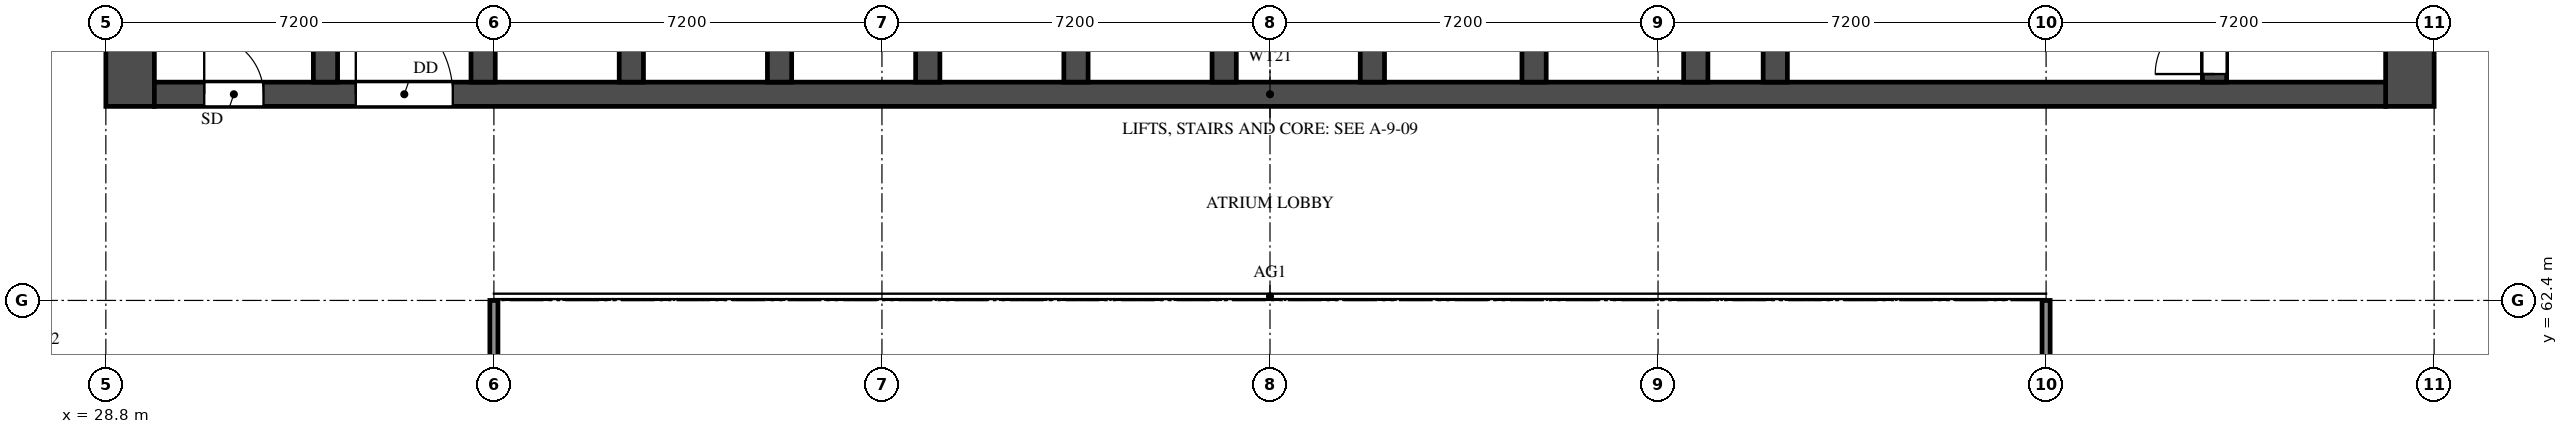
"""IFC4 building model, lengths in metres.
Left out: names, types, materials, properties, quantities, classifications, styles, units other than length and angle.
Written with IfcOpenShell. Run it as: python <this file> out.ifc"""

import sys

from ifc_helpers import new_model, si_unit, direction, frame, frame_2d, origin, place, context, subcontext, project, spatial, rectangle, extrude, element, fill, save


model = new_model("IFC4")
c1 = context("Model", 3, precision=1e-05, world=origin(), true_north=direction((0.0, 1.0)))
c2 = subcontext(c1, "Body", "Model", "MODEL_VIEW")
j1 = project(units=[si_unit("LENGTHUNIT", "METRE"), si_unit("PLANEANGLEUNIT", "RADIAN")], contexts=[c1])
p1 = place(None, origin())
s1 = spatial("IfcSite", under=j1, at=p1, CompositionType="ELEMENT")
p2 = place(p1, origin())
s2 = spatial("IfcBuilding", under=s1, at=p2, CompositionType="ELEMENT")
p3 = place(p2, frame((0.0, 0.0, 48.0)))
s3 = spatial("IfcBuildingStorey", under=s2, at=p3, CompositionType="ELEMENT", Elevation=48.0)
for number, where, z_axis, x_axis in (
    (1, (29.25, 66.0, 0.0), (0.0, 0.0, 1.0), (0.0, 1.0, 0.0)),
    (2, (71.55, 66.0, 0.0), (0.0, 0.0, 1.0), (0.0, 1.0, 0.0)),
):
    element("IfcWall", number, at=place(p3, frame(where, z_axis=z_axis, x_axis=x_axis)), inside=s3, PredefinedType="SHEAR", context=c2, shape_type="SweptSolid", body=[
        extrude(rectangle(XDim=12.0, YDim=0.9, at=frame_2d((6.0, 0.0))), origin(), (0.0, 0.0, 1.0), 3.18),
    ])
p4 = place(p3, frame((29.7, 66.225, 0.0), z_axis=(0.0, 0.0, 1.0), x_axis=(1.0, 0.0, 0.0)))
e3 = element("IfcWall", 3, at=p4, inside=s3, PredefinedType="SHEAR", context=c2, shape_type="SweptSolid", body=[
    extrude(rectangle(XDim=41.4, YDim=0.45, at=frame_2d((20.7, 0.0))), origin(), (0.0, 0.0, 1.0), 3.18),
])
p5 = place(p4, frame((0.925, 0.0, 0.0)))
e4 = element("IfcOpeningElement", 4, at=p5, cuts=e3, PredefinedType="OPENING", context=c2, shape_type="SweptSolid", body=[
    extrude(rectangle(XDim=1.1, YDim=2.1, at=frame_2d((0.55, 1.05))), frame((0.0, 0.235, 0.0), z_axis=(0.0, -1.0, 0.0), x_axis=(1.0, 0.0, 0.0)), (0.0, 0.0, 1.0), 0.47),
])
p6 = place(p4, frame((3.738, 0.0, 0.0)))
e5 = element("IfcOpeningElement", 5, at=p6, cuts=e3, PredefinedType="OPENING", context=c2, shape_type="SweptSolid", body=[
    extrude(rectangle(XDim=1.8, YDim=2.1, at=frame_2d((0.9, 1.05))), frame((0.0, 0.235, 0.0), z_axis=(0.0, -1.0, 0.0), x_axis=(1.0, 0.0, 0.0)), (0.0, 0.0, 1.0), 0.47),
])
p7 = place(p3, frame((32.875, 66.45, 0.0), z_axis=(0.0, 0.0, 1.0), x_axis=(0.0, 1.0, 0.0)))
e6 = element("IfcWall", 6, at=p7, inside=s3, PredefinedType="SHEAR", context=c2, shape_type="SweptSolid", body=[
    extrude(rectangle(XDim=10.65, YDim=0.45, at=frame_2d((5.325, 0.0))), origin(), (0.0, 0.0, 1.0), 3.18),
])
p8 = place(p3, frame((67.925, 66.45, 0.0), z_axis=(0.0, 0.0, 1.0), x_axis=(0.0, 1.0, 0.0)))
e7 = element("IfcWall", 7, at=p8, inside=s3, PredefinedType="SHEAR", context=c2, shape_type="SweptSolid", body=[
    extrude(rectangle(XDim=10.65, YDim=0.45, at=frame_2d((5.325, 0.0))), origin(), (0.0, 0.0, 1.0), 3.18),
])
p9 = place(p8, frame((0.15, 0.0, 0.0)))
e8 = element("IfcOpeningElement", 8, at=p9, cuts=e7, PredefinedType="OPENING", context=c2, shape_type="SweptSolid", body=[
    extrude(rectangle(XDim=1.1, YDim=2.1, at=frame_2d((0.55, 1.05))), frame((0.0, 0.235, 0.0), z_axis=(0.0, -1.0, 0.0), x_axis=(1.0, 0.0, 0.0)), (0.0, 0.0, 1.0), 0.47),
])
p10 = place(p3, frame((59.775, 66.45, 0.0), z_axis=(0.0, 0.0, 1.0), x_axis=(0.0, 1.0, 0.0)))
e9 = element("IfcWall", 9, at=p10, inside=s3, PredefinedType="SHEAR", context=c2, shape_type="SweptSolid", body=[
    extrude(rectangle(XDim=6.025, YDim=0.45, at=frame_2d((3.013, 0.0))), origin(), (0.0, 0.0, 1.0), 3.18),
])
p11 = place(p10, frame((3.85, 0.0, 0.0)))
e10 = element("IfcOpeningElement", 10, at=p11, cuts=e9, PredefinedType="OPENING", context=c2, shape_type="SweptSolid", body=[
    extrude(rectangle(XDim=1.2, YDim=2.1, at=frame_2d((0.6, 1.05))), frame((0.0, 0.235, 0.0), z_axis=(0.0, -1.0, 0.0), x_axis=(1.0, 0.0, 0.0)), (0.0, 0.0, 1.0), 0.47),
])
for number, where, z_axis, x_axis in (
    (11, (35.8, 66.45, 0.0), (0.0, 0.0, 1.0), (0.0, 1.0, 0.0)),
    (12, (38.55, 66.45, 0.0), (0.0, 0.0, 1.0), (0.0, 1.0, 0.0)),
    (13, (41.3, 66.45, 0.0), (0.0, 0.0, 1.0), (0.0, 1.0, 0.0)),
    (14, (44.05, 66.45, 0.0), (0.0, 0.0, 1.0), (0.0, 1.0, 0.0)),
    (15, (46.8, 66.45, 0.0), (0.0, 0.0, 1.0), (0.0, 1.0, 0.0)),
    (16, (49.55, 66.45, 0.0), (0.0, 0.0, 1.0), (0.0, 1.0, 0.0)),
    (17, (52.3, 66.45, 0.0), (0.0, 0.0, 1.0), (0.0, 1.0, 0.0)),
    (18, (55.3, 66.45, 0.0), (0.0, 0.0, 1.0), (0.0, 1.0, 0.0)),
    (19, (58.3, 66.45, 0.0), (0.0, 0.0, 1.0), (0.0, 1.0, 0.0)),
):
    element("IfcWall", number, at=place(p3, frame(where, z_axis=z_axis, x_axis=x_axis)), inside=s3, PredefinedType="SHEAR", context=c2, shape_type="SweptSolid", body=[
        extrude(rectangle(XDim=2.425, YDim=0.45, at=frame_2d((1.212, 0.0))), origin(), (0.0, 0.0, 1.0), 3.18),
    ])
for number, where, z_axis, x_axis in (
    (20, (36.0, 48.0, 0.0), (0.0, 0.0, 1.0), (0.0, 1.0, 0.0)),
    (21, (64.8, 48.0, 0.0), (0.0, 0.0, 1.0), (0.0, 1.0, 0.0)),
):
    element("IfcWall", number, at=place(p3, frame(where, z_axis=z_axis, x_axis=x_axis)), inside=s3, PredefinedType="SOLIDWALL", context=c2, shape_type="SweptSolid", body=[
        extrude(rectangle(XDim=14.4, YDim=0.15, at=frame_2d((7.2, 0.0))), origin(), (0.0, 0.0, 1.0), 2.28),
    ])
p12 = place(p5, origin())
e22 = element("IfcDoor", 22, at=p12, inside=s3, OperationType="SINGLE_SWING_LEFT", PredefinedType="DOOR", context=c2, shape_type="SweptSolid", body=[
    extrude(rectangle(XDim=1.1, YDim=2.1, at=frame_2d((0.55, 1.05))), frame((0.0, 0.025, 0.0), z_axis=(0.0, -1.0, 0.0), x_axis=(1.0, 0.0, 0.0)), (0.0, 0.0, 1.0), 0.05),
])
fill(e4, e22)
p13 = place(p9, origin())
e23 = element("IfcDoor", 23, at=p13, inside=s3, OperationType="SINGLE_SWING_LEFT", PredefinedType="DOOR", context=c2, shape_type="SweptSolid", body=[
    extrude(rectangle(XDim=1.1, YDim=2.1, at=frame_2d((0.55, 1.05))), frame((0.0, 0.025, 0.0), z_axis=(0.0, -1.0, 0.0), x_axis=(1.0, 0.0, 0.0)), (0.0, 0.0, 1.0), 0.05),
])
fill(e8, e23)
p14 = place(p6, origin())
e24 = element("IfcDoor", 24, at=p14, inside=s3, OperationType="DOUBLE_DOOR_SINGLE_SWING", PredefinedType="DOOR", context=c2, shape_type="SweptSolid", body=[
    extrude(rectangle(XDim=1.8, YDim=2.1, at=frame_2d((0.9, 1.05))), frame((0.0, 0.025, 0.0), z_axis=(0.0, -1.0, 0.0), x_axis=(1.0, 0.0, 0.0)), (0.0, 0.0, 1.0), 0.05),
])
fill(e5, e24)
save(model, sys.argv[1])
